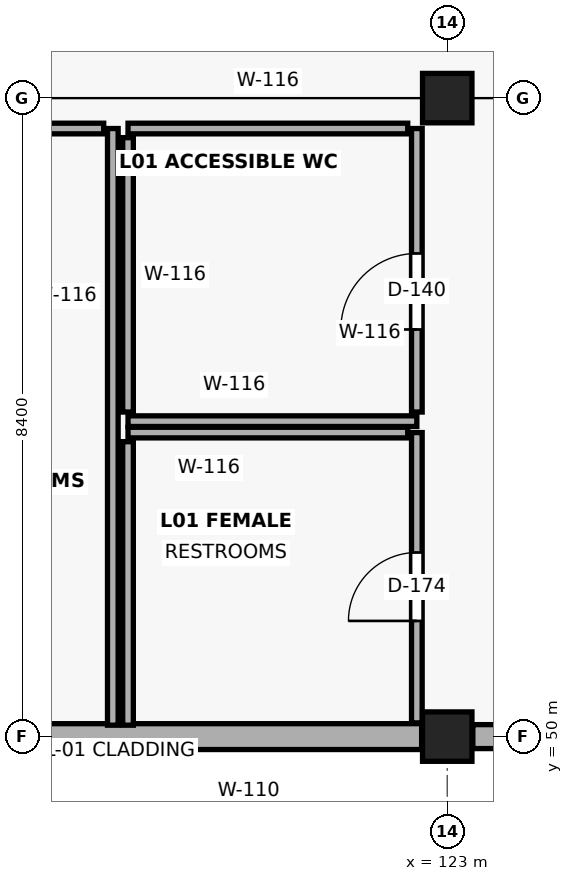
"""IFC4 building model, lengths in metres.
Left out: names, types, materials, properties, quantities, classifications, styles, units other than length and angle.
Written with IfcOpenShell. Run it as: python <this file> out.ifc"""

import sys

from ifc_helpers import new_model, si_unit, direction, frame, frame_2d, origin, origin_2d, place, context, subcontext, project, spatial, rectangle, extrude, element, fill, save


model = new_model("IFC4")
c1 = context("Model", 3, precision=1e-05, world=origin(), true_north=direction((0.0, 1.0)))
c2 = subcontext(c1, "Body", "Model", "MODEL_VIEW")
j1 = project(units=[si_unit("LENGTHUNIT", "METRE"), si_unit("PLANEANGLEUNIT", "RADIAN")], contexts=[c1])
p1 = place(None, origin())
s1 = spatial("IfcSite", under=j1, at=p1, CompositionType="ELEMENT")
p2 = place(p1, origin())
s2 = spatial("IfcBuilding", under=s1, at=p2, CompositionType="ELEMENT")
p3 = place(p2, frame((0.0, 0.0, 5.1)))
s3 = spatial("IfcBuildingStorey", under=s2, at=p3, CompositionType="ELEMENT", Elevation=5.1)
for number, where, z_axis, x_axis in (
    (1, (123.0, 50.0, 0.0), (0.0, 0.0, 1.0), (1.0, 0.0, 0.0)),
    (2, (123.0, 58.4, 0.0), (0.0, 0.0, 1.0), (1.0, 0.0, 0.0)),
):
    element("IfcColumn", number, at=place(p3, frame(where, z_axis=z_axis, x_axis=x_axis)), inside=s3, PredefinedType="COLUMN", context=c2, shape_type="SweptSolid", body=[
        extrude(rectangle(XDim=0.65, YDim=0.65, at=origin_2d()), origin(), (0.0, 0.0, 1.0), 4.8),
    ])
p4 = place(p3, frame((122.663, 50.0, 0.0), z_axis=(0.0, 0.0, 1.0), x_axis=(-1.0, 0.0, 0.0)))
e3 = element("IfcWall", 3, at=p4, inside=s3, PredefinedType="SOLIDWALL", context=c2, shape_type="SweptSolid", body=[
    extrude(rectangle(XDim=8.126, YDim=0.34, at=frame_2d((4.063, 0.0))), origin(), (0.0, 0.0, 1.0), 3.4),
])
p5 = place(p3, frame((131.463, 50.0, 0.0), z_axis=(0.0, 0.0, 1.0), x_axis=(-1.0, 0.0, 0.0)))
e4 = element("IfcWall", 4, at=p5, inside=s3, PredefinedType="SOLIDWALL", context=c2, shape_type="SweptSolid", body=[
    extrude(rectangle(XDim=8.126, YDim=0.315, at=frame_2d((4.063, 0.0))), origin(), (0.0, 0.0, 1.0), 3.4),
])
p6 = place(p5, frame((2.663, 0.0, 0.85)))
e5 = element("IfcOpeningElement", 5, at=p6, cuts=e4, PredefinedType="OPENING", context=c2, shape_type="SweptSolid", body=[
    extrude(rectangle(XDim=2.8, YDim=2.45, at=frame_2d((1.4, 1.225))), frame((0.0, 0.169, 0.0), z_axis=(0.0, -1.0, 0.0), x_axis=(1.0, 0.0, 0.0)), (0.0, 0.0, 1.0), 0.339),
])
p7 = place(p3, frame((118.6, 50.15, 0.0), z_axis=(0.0, 0.0, 1.0), x_axis=(0.0, 1.0, 0.0)))
e6 = element("IfcWall", 6, at=p7, inside=s3, PredefinedType="PLUMBINGWALL", context=c2, shape_type="SweptSolid", body=[
    extrude(rectangle(XDim=7.85, YDim=0.14, at=frame_2d((3.925, 0.0))), origin(), (0.0, 0.0, 1.0), 4.35),
])
p8 = place(p3, frame((118.48, 58.0, 0.0), z_axis=(0.0, 0.0, 1.0), x_axis=(-1.0, 0.0, 0.0)))
e7 = element("IfcWall", 7, at=p8, inside=s3, PredefinedType="PLUMBINGWALL", context=c2, shape_type="SweptSolid", body=[
    extrude(rectangle(XDim=3.88, YDim=0.14, at=frame_2d((1.94, 0.0))), origin(), (0.0, 0.0, 1.0), 4.35),
])
p9 = place(p8, frame((1.03, 0.0, 0.0)))
e8 = element("IfcOpeningElement", 8, at=p9, cuts=e7, PredefinedType="OPENING", context=c2, shape_type="SweptSolid", body=[
    extrude(rectangle(XDim=0.9, YDim=2.15, at=frame_2d((0.45, 1.075))), frame((0.0, 0.082, 0.0), z_axis=(0.0, -1.0, 0.0), x_axis=(1.0, 0.0, 0.0)), (0.0, 0.0, 1.0), 0.164),
])
p10 = place(p3, frame((122.6, 50.181, 0.0), z_axis=(0.0, 0.0, 1.0), x_axis=(0.0, 1.0, 0.0)))
e9 = element("IfcWall", 9, at=p10, inside=s3, PredefinedType="PLUMBINGWALL", context=c2, shape_type="SweptSolid", body=[
    extrude(rectangle(XDim=3.819, YDim=0.14, at=frame_2d((1.91, 0.0))), origin(), (0.0, 0.0, 1.0), 4.35),
])
p11 = place(p10, frame((1.342, 0.0, 0.0)))
e10 = element("IfcOpeningElement", 10, at=p11, cuts=e9, PredefinedType="OPENING", context=c2, shape_type="SweptSolid", body=[
    extrude(rectangle(XDim=0.9, YDim=2.15, at=frame_2d((0.45, 1.075))), frame((0.0, 0.082, 0.0), z_axis=(0.0, -1.0, 0.0), x_axis=(1.0, 0.0, 0.0)), (0.0, 0.0, 1.0), 0.164),
])
p12 = place(p3, frame((122.48, 54.0, 0.0), z_axis=(0.0, 0.0, 1.0), x_axis=(-1.0, 0.0, 0.0)))
e11 = element("IfcWall", 11, at=p12, inside=s3, PredefinedType="PLUMBINGWALL", context=c2, shape_type="SweptSolid", body=[
    extrude(rectangle(XDim=3.68, YDim=0.14, at=frame_2d((1.84, 0.0))), origin(), (0.0, 0.0, 1.0), 4.35),
])
p13 = place(p3, frame((118.8, 53.88, 0.0), z_axis=(0.0, 0.0, 1.0), x_axis=(0.0, -1.0, 0.0)))
e12 = element("IfcWall", 12, at=p13, inside=s3, PredefinedType="PLUMBINGWALL", context=c2, shape_type="SweptSolid", body=[
    extrude(rectangle(XDim=3.73, YDim=0.14, at=frame_2d((1.865, 0.0))), origin(), (0.0, 0.0, 1.0), 4.35),
])
p14 = place(p3, frame((118.8, 54.15, 0.0), z_axis=(0.0, 0.0, 1.0), x_axis=(1.0, 0.0, 0.0)))
e13 = element("IfcWall", 13, at=p14, inside=s3, PredefinedType="PLUMBINGWALL", context=c2, shape_type="SweptSolid", body=[
    extrude(rectangle(XDim=3.8, YDim=0.14, at=frame_2d((1.9, 0.0))), origin(), (0.0, 0.0, 1.0), 4.35),
])
p15 = place(p3, frame((122.6, 54.27, 0.0), z_axis=(0.0, 0.0, 1.0), x_axis=(0.0, 1.0, 0.0)))
e14 = element("IfcWall", 14, at=p15, inside=s3, PredefinedType="PLUMBINGWALL", context=c2, shape_type="SweptSolid", body=[
    extrude(rectangle(XDim=3.73, YDim=0.14, at=frame_2d((1.865, 0.0))), origin(), (0.0, 0.0, 1.0), 4.35),
])
p16 = place(p15, frame((1.086, 0.0, 0.0)))
e15 = element("IfcOpeningElement", 15, at=p16, cuts=e14, PredefinedType="OPENING", context=c2, shape_type="SweptSolid", body=[
    extrude(rectangle(XDim=1.0, YDim=2.15, at=frame_2d((0.5, 1.075))), frame((0.0, 0.082, 0.0), z_axis=(0.0, -1.0, 0.0), x_axis=(1.0, 0.0, 0.0)), (0.0, 0.0, 1.0), 0.164),
])
p17 = place(p3, frame((122.48, 58.0, 0.0), z_axis=(0.0, 0.0, 1.0), x_axis=(-1.0, 0.0, 0.0)))
e16 = element("IfcWall", 16, at=p17, inside=s3, PredefinedType="PLUMBINGWALL", context=c2, shape_type="SweptSolid", body=[
    extrude(rectangle(XDim=3.68, YDim=0.14, at=frame_2d((1.84, 0.0))), origin(), (0.0, 0.0, 1.0), 4.35),
])
p18 = place(p3, frame((118.8, 57.88, 0.0), z_axis=(0.0, 0.0, 1.0), x_axis=(0.0, -1.0, 0.0)))
e17 = element("IfcWall", 17, at=p18, inside=s3, PredefinedType="PLUMBINGWALL", context=c2, shape_type="SweptSolid", body=[
    extrude(rectangle(XDim=3.61, YDim=0.14, at=frame_2d((1.805, 0.0))), origin(), (0.0, 0.0, 1.0), 4.35),
])
p19 = place(p11, origin())
e18 = element("IfcDoor", 18, at=p19, inside=s3, OperationType="SINGLE_SWING_LEFT", PredefinedType="DOOR", context=c2, shape_type="SweptSolid", body=[
    extrude(rectangle(XDim=0.9, YDim=2.15, at=frame_2d((0.45, 1.075))), frame((0.0, 0.025, 0.0), z_axis=(0.0, -1.0, 0.0), x_axis=(1.0, 0.0, 0.0)), (0.0, 0.0, 1.0), 0.05),
])
fill(e10, e18)
p20 = place(p16, origin())
e19 = element("IfcDoor", 19, at=p20, inside=s3, OperationType="SINGLE_SWING_LEFT", PredefinedType="DOOR", context=c2, shape_type="SweptSolid", body=[
    extrude(rectangle(XDim=1.0, YDim=2.15, at=frame_2d((0.5, 1.075))), frame((0.0, 0.025, 0.0), z_axis=(0.0, -1.0, 0.0), x_axis=(1.0, 0.0, 0.0)), (0.0, 0.0, 1.0), 0.05),
])
fill(e15, e19)
save(model, sys.argv[1])
